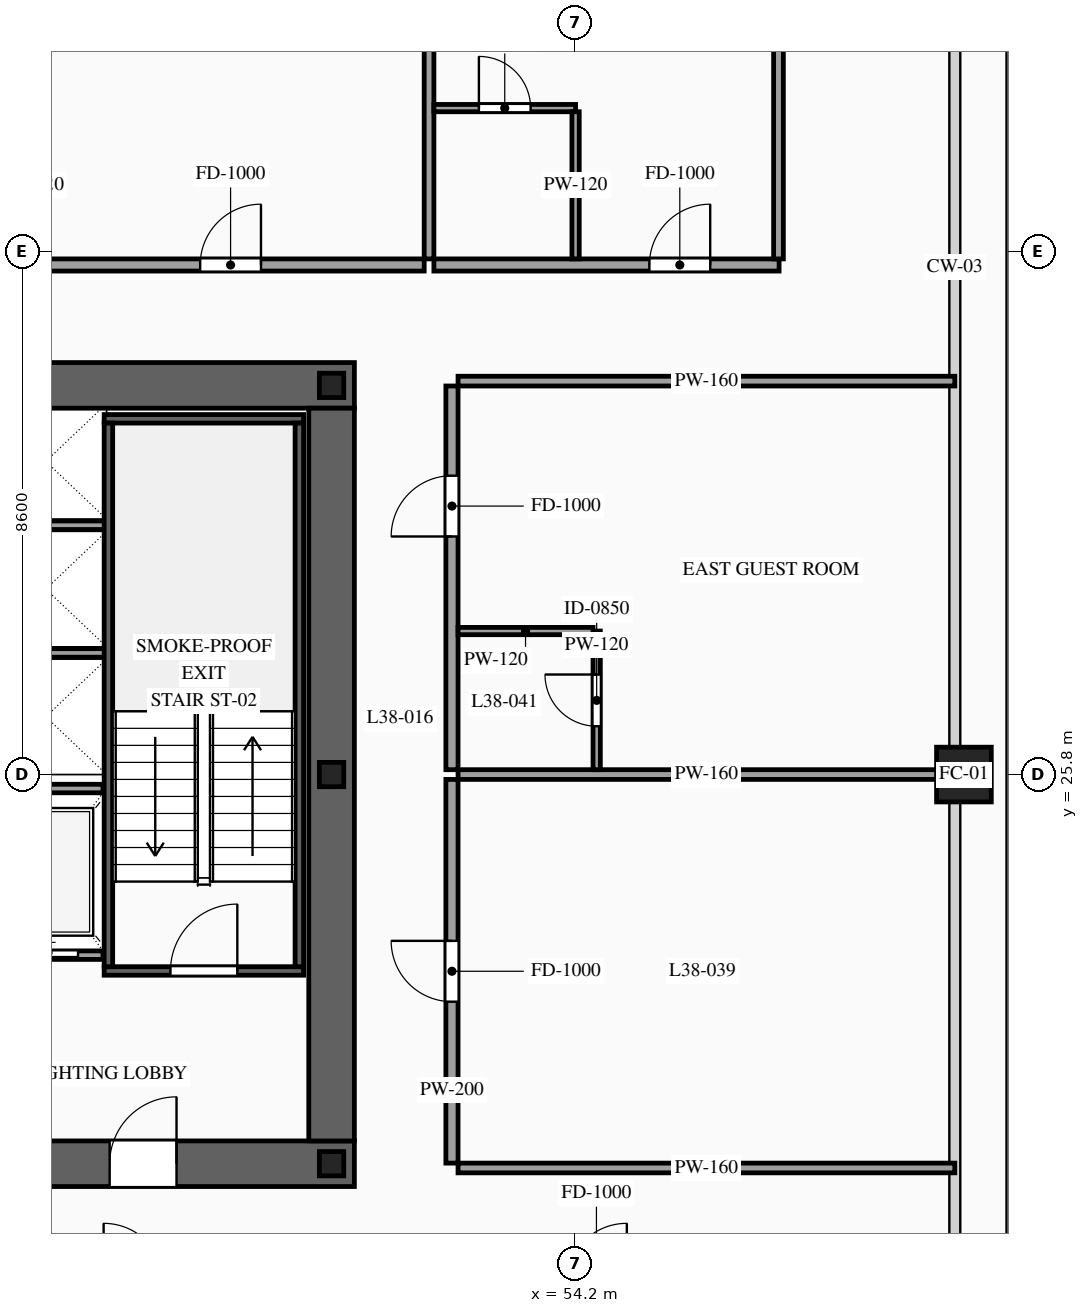
"""IFC4 building model, lengths in metres.
Left out: names, types, materials, properties, quantities, classifications, styles, units other than length and angle.
Written with IfcOpenShell. Run it as: python <this file> out.ifc"""

import sys

from ifc_helpers import new_model, si_unit, direction, frame, frame_2d, origin, origin_2d, place, context, subcontext, project, spatial, rectangle, hollow_rectangle, i_section, extrude, source, transform, mapped, element, fill, save


model = new_model("IFC4")
c1 = context("Model", 3, precision=1e-05, world=origin(), true_north=direction((0.0, 1.0)))
c2 = subcontext(c1, "Body", "Model", "MODEL_VIEW")
j1 = project(units=[si_unit("LENGTHUNIT", "METRE"), si_unit("PLANEANGLEUNIT", "RADIAN")], contexts=[c1])
p1 = place(None, origin())
s1 = spatial("IfcSite", under=j1, at=p1, CompositionType="ELEMENT")
p2 = place(p1, origin())
s2 = spatial("IfcBuilding", under=s1, at=p2, CompositionType="ELEMENT")
p3 = place(p2, frame((0.0, 0.0, 145.2)))
s3 = spatial("IfcBuildingStorey", under=s2, at=p3, CompositionType="ELEMENT", Elevation=145.2)
p4 = place(p3, frame((23.425, 19.4, 0.0), z_axis=(0.0, 0.0, 1.0), x_axis=(1.0, 0.0, 0.0)))
e1 = element("IfcWall", 1, at=p4, inside=s3, PredefinedType="SHEAR", context=c2, shape_type="SweptSolid", body=[
    extrude(rectangle(XDim=27.15, YDim=0.75, at=frame_2d((13.575, 0.0))), origin(), (0.0, 0.0, 1.0), 3.6),
])
p5 = place(p4, frame((2.025, 0.0, 0.0)))
e2 = element("IfcOpeningElement", 2, at=p5, cuts=e1, PredefinedType="OPENING", context=c2, shape_type="SweptSolid", body=[
    extrude(rectangle(XDim=1.1, YDim=2.2, at=frame_2d((0.55, 1.1))), frame((0.0, 0.39, 0.0), z_axis=(0.0, -1.0, 0.0), x_axis=(1.0, 0.0, 0.0)), (0.0, 0.0, 1.0), 0.78),
])
p6 = place(p4, frame((9.925, 0.0, 0.0)))
e3 = element("IfcOpeningElement", 3, at=p6, cuts=e1, PredefinedType="OPENING", context=c2, shape_type="SweptSolid", body=[
    extrude(rectangle(XDim=1.1, YDim=2.2, at=frame_2d((0.55, 1.1))), frame((0.0, 0.39, 0.0), z_axis=(0.0, -1.0, 0.0), x_axis=(1.0, 0.0, 0.0)), (0.0, 0.0, 1.0), 0.78),
])
p7 = place(p4, frame((23.125, 0.0, 0.0)))
e4 = element("IfcOpeningElement", 4, at=p7, cuts=e1, PredefinedType="OPENING", context=c2, shape_type="SweptSolid", body=[
    extrude(rectangle(XDim=1.1, YDim=2.2, at=frame_2d((0.55, 1.1))), frame((0.0, 0.39, 0.0), z_axis=(0.0, -1.0, 0.0), x_axis=(1.0, 0.0, 0.0)), (0.0, 0.0, 1.0), 0.78),
])
p8 = place(p4, frame((19.745, 0.0, 0.0)))
e5 = element("IfcOpeningElement", 5, at=p8, cuts=e1, PredefinedType="OPENING", context=c2, shape_type="SweptSolid", body=[
    extrude(rectangle(XDim=0.9, YDim=2.15, at=frame_2d((0.45, 1.075))), frame((0.0, 0.39, 0.0), z_axis=(0.0, -1.0, 0.0), x_axis=(1.0, 0.0, 0.0)), (0.0, 0.0, 1.0), 0.78),
])
p9 = place(p4, frame((18.305, 0.0, 0.0)))
e6 = element("IfcOpeningElement", 6, at=p9, cuts=e1, PredefinedType="OPENING", context=c2, shape_type="SweptSolid", body=[
    extrude(rectangle(XDim=0.9, YDim=2.15, at=frame_2d((0.45, 1.075))), frame((0.0, 0.39, 0.0), z_axis=(0.0, -1.0, 0.0), x_axis=(1.0, 0.0, 0.0)), (0.0, 0.0, 1.0), 0.78),
])
p10 = place(p3, frame((23.425, 32.2, 0.0), z_axis=(0.0, 0.0, 1.0), x_axis=(1.0, 0.0, 0.0)))
e7 = element("IfcWall", 7, at=p10, inside=s3, PredefinedType="SHEAR", context=c2, shape_type="SweptSolid", body=[
    extrude(rectangle(XDim=27.15, YDim=0.75, at=frame_2d((13.575, 0.0))), origin(), (0.0, 0.0, 1.0), 3.6),
])
p11 = place(p10, frame((4.645, 0.0, 0.0)))
e8 = element("IfcOpeningElement", 8, at=p11, cuts=e7, PredefinedType="OPENING", context=c2, shape_type="SweptSolid", body=[
    extrude(rectangle(XDim=0.9, YDim=2.15, at=frame_2d((0.45, 1.075))), frame((0.0, 0.39, 0.0), z_axis=(0.0, -1.0, 0.0), x_axis=(1.0, 0.0, 0.0)), (0.0, 0.0, 1.0), 0.78),
])
p12 = place(p10, frame((9.925, 0.0, 0.0)))
e9 = element("IfcOpeningElement", 9, at=p12, cuts=e7, PredefinedType="OPENING", context=c2, shape_type="SweptSolid", body=[
    extrude(rectangle(XDim=1.1, YDim=2.2, at=frame_2d((0.55, 1.1))), frame((0.0, 0.39, 0.0), z_axis=(0.0, -1.0, 0.0), x_axis=(1.0, 0.0, 0.0)), (0.0, 0.0, 1.0), 0.78),
])
p13 = place(p10, frame((15.775, 0.0, 0.0)))
e10 = element("IfcOpeningElement", 10, at=p13, cuts=e7, PredefinedType="OPENING", context=c2, shape_type="SweptSolid", body=[
    extrude(rectangle(XDim=1.1, YDim=2.2, at=frame_2d((0.55, 1.1))), frame((0.0, 0.39, 0.0), z_axis=(0.0, -1.0, 0.0), x_axis=(1.0, 0.0, 0.0)), (0.0, 0.0, 1.0), 0.78),
])
p14 = place(p10, frame((19.745, 0.0, 0.0)))
e11 = element("IfcOpeningElement", 11, at=p14, cuts=e7, PredefinedType="OPENING", context=c2, shape_type="SweptSolid", body=[
    extrude(rectangle(XDim=0.9, YDim=2.15, at=frame_2d((0.45, 1.075))), frame((0.0, 0.39, 0.0), z_axis=(0.0, -1.0, 0.0), x_axis=(1.0, 0.0, 0.0)), (0.0, 0.0, 1.0), 0.78),
])
m1 = source(origin(), c2, "Body", "SweptSolid", [
    extrude(rectangle(XDim=12.05, YDim=0.75, at=frame_2d((6.025, 0.0))), origin(), (0.0, 0.0, 1.0), 3.6),
])
p15 = place(p3, frame((50.2, 19.775, 0.0), z_axis=(0.0, 0.0, 1.0), x_axis=(0.0, 1.0, 0.0)))
e12 = element("IfcWall", 12, at=p15, inside=s3, PredefinedType="SHEAR", context=c2, shape_type="MappedRepresentation", body=[
    mapped(m1, transform((0.0, 0.0, 0.0), scale=1.0)),
])
m2 = source(origin(), c2, "Body", "SweptSolid", [
    extrude(i_section(OverallWidth=0.4, OverallDepth=0.4, WebThickness=0.013, FlangeThickness=0.021, at=origin_2d()), origin(), (0.0, 0.0, 1.0), 3.6),
])
for number, where, z_axis, x_axis in (
    (13, (50.2, 19.4, 0.0), (0.0, 0.0, 1.0), (1.0, 0.0, 0.0)),
    (14, (50.2, 25.8, 0.0), (0.0, 0.0, 1.0), (1.0, 0.0, 0.0)),
    (15, (50.2, 32.2, 0.0), (0.0, 0.0, 1.0), (1.0, 0.0, 0.0)),
):
    element("IfcColumn", number, at=place(p3, frame(where, z_axis=z_axis, x_axis=x_axis)), inside=s3, PredefinedType="COLUMN", context=c2, shape_type="MappedRepresentation", body=[
        mapped(m2, transform((0.0, 0.0, 0.0), scale=1.0)),
    ])
m3 = source(origin(), c2, "Body", "SweptSolid", [
    extrude(hollow_rectangle(XDim=0.9, YDim=0.9, WallThickness=0.042, at=origin_2d()), origin(), (0.0, 0.0, 1.0), 3.6),
])
p16 = place(p3, frame((60.6, 25.8, 0.0), z_axis=(0.0, 0.0, 1.0), x_axis=(1.0, 0.0, 0.0)))
e16 = element("IfcColumn", 16, at=p16, inside=s3, PredefinedType="COLUMN", context=c2, shape_type="MappedRepresentation", body=[
    mapped(m3, transform((0.0, 0.0, 0.0), scale=1.0)),
])
p17 = place(p3, frame((44.52, 22.83, 0.0), z_axis=(0.0, 0.0, 1.0), x_axis=(1.0, 0.0, 0.0)))
e17 = element("IfcWall", 17, at=p17, inside=s3, PredefinedType="SOLIDWALL", context=c2, shape_type="SweptSolid", body=[
    extrude(rectangle(XDim=1.92, YDim=0.14, at=frame_2d((0.96, 0.0))), origin(), (0.0, 0.0, 1.0), 3.38),
])
p18 = place(p17, frame((0.41, 0.0, 0.0)))
e18 = element("IfcOpeningElement", 18, at=p18, cuts=e17, PredefinedType="OPENING", context=c2, shape_type="SweptSolid", body=[
    extrude(rectangle(XDim=1.1, YDim=2.2, at=frame_2d((0.55, 1.1))), frame((0.0, 0.085, 0.0), z_axis=(0.0, -1.0, 0.0), x_axis=(1.0, 0.0, 0.0)), (0.0, 0.0, 1.0), 0.17),
])
m4 = source(origin(), c2, "Body", "SweptSolid", [
    extrude(rectangle(XDim=1.92, YDim=0.14, at=frame_2d((0.96, 0.0))), origin(), (0.0, 0.0, 1.0), 3.38),
])
p19 = place(p3, frame((44.52, 25.57, 0.0), z_axis=(0.0, 0.0, 1.0), x_axis=(1.0, 0.0, 0.0)))
e19 = element("IfcWall", 19, at=p19, inside=s3, PredefinedType="SOLIDWALL", context=c2, shape_type="MappedRepresentation", body=[
    mapped(m4, transform((0.0, 0.0, 0.0), scale=1.0)),
])
m5 = source(origin(), c2, "Body", "SweptSolid", [
    extrude(rectangle(XDim=2.0, YDim=0.14, at=frame_2d((1.0, 0.0))), origin(), (0.0, 0.0, 1.0), 3.38),
])
for number, where, z_axis, x_axis in (
    (20, (44.5, 27.8, 0.0), (0.0, 0.0, 1.0), (1.0, 0.0, 0.0)),
    (21, (44.5, 29.9, 0.0), (0.0, 0.0, 1.0), (1.0, 0.0, 0.0)),
):
    element("IfcWall", number, at=place(p3, frame(where, z_axis=z_axis, x_axis=x_axis)), inside=s3, PredefinedType="SOLIDWALL", context=c2, shape_type="MappedRepresentation", body=[
        mapped(m5, transform((0.0, 0.0, 0.0), scale=1.0)),
    ])
p20 = place(p3, frame((46.46, 22.57, 0.0), z_axis=(0.0, 0.0, 1.0), x_axis=(1.0, 0.0, 0.0)))
e22 = element("IfcWall", 22, at=p20, inside=s3, PredefinedType="SOLIDWALL", context=c2, shape_type="SweptSolid", body=[
    extrude(rectangle(XDim=3.28, YDim=0.14, at=frame_2d((1.64, 0.0))), origin(), (0.0, 0.0, 1.0), 3.38),
])
p21 = place(p20, frame((1.09, 0.0, 0.0)))
e23 = element("IfcOpeningElement", 23, at=p21, cuts=e22, PredefinedType="OPENING", context=c2, shape_type="SweptSolid", body=[
    extrude(rectangle(XDim=1.1, YDim=2.2, at=frame_2d((0.55, 1.1))), frame((0.0, 0.085, 0.0), z_axis=(0.0, -1.0, 0.0), x_axis=(1.0, 0.0, 0.0)), (0.0, 0.0, 1.0), 0.17),
])
m6 = source(origin(), c2, "Body", "SweptSolid", [
    extrude(rectangle(XDim=3.28, YDim=0.14, at=frame_2d((1.64, 0.0))), origin(), (0.0, 0.0, 1.0), 3.38),
])
p22 = place(p3, frame((46.46, 31.65, 0.0), z_axis=(0.0, 0.0, 1.0), x_axis=(1.0, 0.0, 0.0)))
e24 = element("IfcWall", 24, at=p22, inside=s3, PredefinedType="SOLIDWALL", context=c2, shape_type="MappedRepresentation", body=[
    mapped(m6, transform((0.0, 0.0, 0.0), scale=1.0)),
])
m7 = source(origin(), c2, "Body", "SweptSolid", [
    extrude(rectangle(XDim=8.94, YDim=0.14, at=frame_2d((4.47, 0.0))), origin(), (0.0, 0.0, 1.0), 3.38),
])
for number, where, z_axis, x_axis in (
    (25, (46.53, 22.64, 0.0), (0.0, 0.0, 1.0), (0.0, 1.0, 0.0)),
    (26, (49.67, 22.64, 0.0), (0.0, 0.0, 1.0), (0.0, 1.0, 0.0)),
):
    element("IfcWall", number, at=place(p3, frame(where, z_axis=z_axis, x_axis=x_axis)), inside=s3, PredefinedType="SOLIDWALL", context=c2, shape_type="MappedRepresentation", body=[
        mapped(m7, transform((0.0, 0.0, 0.0), scale=1.0)),
    ])
p23 = place(p3, frame((42.946, 34.18, 0.0), z_axis=(0.0, 0.0, 1.0), x_axis=(1.0, 0.0, 0.0)))
e27 = element("IfcWall", 27, at=p23, inside=s3, PredefinedType="PARTITIONING", context=c2, shape_type="SweptSolid", body=[
    extrude(rectangle(XDim=8.777, YDim=0.2, at=frame_2d((4.388, 0.0))), origin(), (0.0, 0.0, 1.0), 3.38),
])
p24 = place(p23, frame((5.093, 0.0, 0.0)))
e28 = element("IfcOpeningElement", 28, at=p24, cuts=e27, PredefinedType="OPENING", context=c2, shape_type="SweptSolid", body=[
    extrude(rectangle(XDim=1.0, YDim=2.2, at=frame_2d((0.5, 1.1))), frame((0.0, 0.115, 0.0), z_axis=(0.0, -1.0, 0.0), x_axis=(1.0, 0.0, 0.0)), (0.0, 0.0, 1.0), 0.23),
])
m8 = source(origin(), c2, "Body", "SweptSolid", [
    extrude(rectangle(XDim=14.97, YDim=0.16, at=frame_2d((7.485, 0.0))), origin(), (0.0, 0.0, 1.0), 3.38),
])
p25 = place(p3, frame((51.803, 34.28, 0.0), z_axis=(0.0, 0.0, 1.0), x_axis=(0.0, 1.0, 0.0)))
e29 = element("IfcWall", 29, at=p25, inside=s3, PredefinedType="PARTITIONING", context=c2, shape_type="MappedRepresentation", body=[
    mapped(m8, transform((0.0, 0.0, 0.0), scale=1.0)),
])
p26 = place(p3, frame((51.883, 34.18, 0.0), z_axis=(0.0, 0.0, 1.0), x_axis=(1.0, 0.0, 0.0)))
e30 = element("IfcWall", 30, at=p26, inside=s3, PredefinedType="PARTITIONING", context=c2, shape_type="SweptSolid", body=[
    extrude(rectangle(XDim=5.677, YDim=0.2, at=frame_2d((2.838, 0.0))), origin(), (0.0, 0.0, 1.0), 3.38),
])
p27 = place(p26, frame((3.544, 0.0, 0.0)))
e31 = element("IfcOpeningElement", 31, at=p27, cuts=e30, PredefinedType="OPENING", context=c2, shape_type="SweptSolid", body=[
    extrude(rectangle(XDim=1.0, YDim=2.2, at=frame_2d((0.5, 1.1))), frame((0.0, 0.115, 0.0), z_axis=(0.0, -1.0, 0.0), x_axis=(1.0, 0.0, 0.0)), (0.0, 0.0, 1.0), 0.23),
])
m9 = source(origin(), c2, "Body", "SweptSolid", [
    extrude(rectangle(XDim=14.82, YDim=0.16, at=frame_2d((7.41, 0.0))), origin(), (0.0, 0.0, 1.0), 3.38),
])
p28 = place(p3, frame((57.55, 34.28, 0.0), z_axis=(0.0, 0.0, 1.0), x_axis=(0.0, 1.0, 0.0)))
e32 = element("IfcWall", 32, at=p28, inside=s3, PredefinedType="PARTITIONING", context=c2, shape_type="MappedRepresentation", body=[
    mapped(m9, transform((0.0, 0.0, 0.0), scale=1.0)),
])
p29 = place(p3, frame((51.883, 36.76, 0.0), z_axis=(0.0, 0.0, 1.0), x_axis=(1.0, 0.0, 0.0)))
e33 = element("IfcWall", 33, at=p29, inside=s3, PredefinedType="PARTITIONING", context=c2, shape_type="SweptSolid", body=[
    extrude(rectangle(XDim=2.33, YDim=0.12, at=frame_2d((1.165, 0.0))), origin(), (0.0, 0.0, 1.0), 3.38),
])
p30 = place(p29, frame((0.74, 0.0, 0.0)))
e34 = element("IfcOpeningElement", 34, at=p30, cuts=e33, PredefinedType="OPENING", context=c2, shape_type="SweptSolid", body=[
    extrude(rectangle(XDim=0.85, YDim=2.1, at=frame_2d((0.425, 1.05))), frame((0.0, 0.075, 0.0), z_axis=(0.0, -1.0, 0.0), x_axis=(1.0, 0.0, 0.0)), (0.0, 0.0, 1.0), 0.15),
])
m10 = source(origin(), c2, "Body", "SweptSolid", [
    extrude(rectangle(XDim=2.42, YDim=0.12, at=frame_2d((1.21, 0.0))), origin(), (0.0, 0.0, 1.0), 3.38),
])
p31 = place(p3, frame((54.213, 34.28, 0.0), z_axis=(0.0, 0.0, 1.0), x_axis=(0.0, 1.0, 0.0)))
e35 = element("IfcWall", 35, at=p31, inside=s3, PredefinedType="PARTITIONING", context=c2, shape_type="MappedRepresentation", body=[
    mapped(m10, transform((0.0, 0.0, 0.0), scale=1.0)),
])
p32 = place(p3, frame((52.18, 19.41, 0.0), z_axis=(0.0, 0.0, 1.0), x_axis=(0.0, 1.0, 0.0)))
e36 = element("IfcWall", 36, at=p32, inside=s3, PredefinedType="PARTITIONING", context=c2, shape_type="SweptSolid", body=[
    extrude(rectangle(XDim=6.31, YDim=0.2, at=frame_2d((3.155, 0.0))), origin(), (0.0, 0.0, 1.0), 3.38),
])
p33 = place(p32, frame((2.655, 0.0, 0.0)))
e37 = element("IfcOpeningElement", 37, at=p33, cuts=e36, PredefinedType="OPENING", context=c2, shape_type="SweptSolid", body=[
    extrude(rectangle(XDim=1.0, YDim=2.2, at=frame_2d((0.5, 1.1))), frame((0.0, 0.115, 0.0), z_axis=(0.0, -1.0, 0.0), x_axis=(1.0, 0.0, 0.0)), (0.0, 0.0, 1.0), 0.23),
])
m11 = source(origin(), c2, "Body", "SweptSolid", [
    extrude(rectangle(XDim=8.17, YDim=0.16, at=frame_2d((4.085, 0.0))), origin(), (0.0, 0.0, 1.0), 2.675),
])
p34 = place(p3, frame((52.28, 25.8, 0.0), z_axis=(0.0, 0.0, 1.0), x_axis=(1.0, 0.0, 0.0)))
e38 = element("IfcWall", 38, at=p34, inside=s3, PredefinedType="PARTITIONING", context=c2, shape_type="MappedRepresentation", body=[
    mapped(m11, transform((0.0, 0.0, 0.0), scale=1.0)),
])
m12 = source(origin(), c2, "Body", "SweptSolid", [
    extrude(rectangle(XDim=8.17, YDim=0.16, at=frame_2d((4.085, 0.0))), origin(), (0.0, 0.0, 1.0), 2.875),
])
p35 = place(p3, frame((52.28, 19.33, 0.0), z_axis=(0.0, 0.0, 1.0), x_axis=(1.0, 0.0, 0.0)))
e39 = element("IfcWall", 39, at=p35, inside=s3, PredefinedType="PARTITIONING", context=c2, shape_type="MappedRepresentation", body=[
    mapped(m12, transform((0.0, 0.0, 0.0), scale=1.0)),
])
p36 = place(p3, frame((52.18, 25.88, 0.0), z_axis=(0.0, 0.0, 1.0), x_axis=(0.0, 1.0, 0.0)))
e40 = element("IfcWall", 40, at=p36, inside=s3, PredefinedType="PARTITIONING", context=c2, shape_type="SweptSolid", body=[
    extrude(rectangle(XDim=6.31, YDim=0.2, at=frame_2d((3.155, 0.0))), origin(), (0.0, 0.0, 1.0), 3.38),
])
p37 = place(p36, frame((3.835, 0.0, 0.0)))
e41 = element("IfcOpeningElement", 41, at=p37, cuts=e40, PredefinedType="OPENING", context=c2, shape_type="SweptSolid", body=[
    extrude(rectangle(XDim=1.0, YDim=2.2, at=frame_2d((0.5, 1.1))), frame((0.0, 0.115, 0.0), z_axis=(0.0, -1.0, 0.0), x_axis=(1.0, 0.0, 0.0)), (0.0, 0.0, 1.0), 0.23),
])
p38 = place(p3, frame((52.28, 32.27, 0.0), z_axis=(0.0, 0.0, 1.0), x_axis=(1.0, 0.0, 0.0)))
e42 = element("IfcWall", 42, at=p38, inside=s3, PredefinedType="PARTITIONING", context=c2, shape_type="MappedRepresentation", body=[
    mapped(m12, transform((0.0, 0.0, 0.0), scale=1.0)),
])
p39 = place(p3, frame((54.56, 25.88, 0.0), z_axis=(0.0, 0.0, 1.0), x_axis=(0.0, 1.0, 0.0)))
e43 = element("IfcWall", 43, at=p39, inside=s3, PredefinedType="PARTITIONING", context=c2, shape_type="SweptSolid", body=[
    extrude(rectangle(XDim=2.28, YDim=0.12, at=frame_2d((1.14, 0.0))), origin(), (0.0, 0.0, 1.0), 3.38),
])
p40 = place(p39, frame((0.715, 0.0, 0.0)))
e44 = element("IfcOpeningElement", 44, at=p40, cuts=e43, PredefinedType="OPENING", context=c2, shape_type="SweptSolid", body=[
    extrude(rectangle(XDim=0.85, YDim=2.1, at=frame_2d((0.425, 1.05))), frame((0.0, 0.075, 0.0), z_axis=(0.0, -1.0, 0.0), x_axis=(1.0, 0.0, 0.0)), (0.0, 0.0, 1.0), 0.15),
])
m13 = source(origin(), c2, "Body", "SweptSolid", [
    extrude(rectangle(XDim=2.22, YDim=0.12, at=frame_2d((1.11, 0.0))), origin(), (0.0, 0.0, 1.0), 3.38),
])
p41 = place(p3, frame((52.28, 28.16, 0.0), z_axis=(0.0, 0.0, 1.0), x_axis=(1.0, 0.0, 0.0)))
e45 = element("IfcWall", 45, at=p41, inside=s3, PredefinedType="PARTITIONING", context=c2, shape_type="MappedRepresentation", body=[
    mapped(m13, transform((0.0, 0.0, 0.0), scale=1.0)),
])
m14 = source(origin(), c2, "Body", "SweptSolid", [
    extrude(rectangle(XDim=1.1, YDim=2.2, at=frame_2d((0.55, 1.1))), frame((0.0, 0.025, 0.0), z_axis=(0.0, -1.0, 0.0), x_axis=(1.0, 0.0, 0.0)), (0.0, 0.0, 1.0), 0.05),
])
p42 = place(p18, origin())
e46 = element("IfcDoor", 46, at=p42, inside=s3, OperationType="SLIDING_TO_RIGHT", PredefinedType="DOOR", context=c2, shape_type="MappedRepresentation", body=[
    mapped(m14, transform((0.0, 0.0, 0.0), scale=1.0)),
])
fill(e18, e46)
m15 = source(origin(), c2, "Body", "SweptSolid", [
    extrude(rectangle(XDim=1.1, YDim=2.2, at=frame_2d((0.55, 1.1))), frame((0.0, 0.025, 0.0), z_axis=(0.0, -1.0, 0.0), x_axis=(1.0, 0.0, 0.0)), (0.0, 0.0, 1.0), 0.05),
])
p43 = place(p21, origin())
e47 = element("IfcDoor", 47, at=p43, inside=s3, OperationType="SINGLE_SWING_RIGHT", PredefinedType="DOOR", context=c2, shape_type="MappedRepresentation", body=[
    mapped(m15, transform((0.0, 0.0, 0.0), scale=1.0)),
])
fill(e23, e47)
p44 = place(p7, origin())
e48 = element("IfcDoor", 48, at=p44, inside=s3, OperationType="SINGLE_SWING_RIGHT", PredefinedType="DOOR", context=c2, shape_type="MappedRepresentation", body=[
    mapped(m15, transform((0.0, 0.0, 0.0), scale=1.0)),
])
fill(e4, e48)
m16 = source(origin(), c2, "Body", "SweptSolid", [
    extrude(rectangle(XDim=1.0, YDim=2.2, at=frame_2d((0.5, 1.1))), frame((0.0, 0.025, 0.0), z_axis=(0.0, -1.0, 0.0), x_axis=(1.0, 0.0, 0.0)), (0.0, 0.0, 1.0), 0.05),
])
p45 = place(p24, origin())
e49 = element("IfcDoor", 49, at=p45, inside=s3, OperationType="SINGLE_SWING_RIGHT", PredefinedType="DOOR", context=c2, shape_type="MappedRepresentation", body=[
    mapped(m16, transform((0.0, 0.0, 0.0), scale=1.0)),
])
fill(e28, e49)
p46 = place(p27, origin())
e50 = element("IfcDoor", 50, at=p46, inside=s3, OperationType="SINGLE_SWING_RIGHT", PredefinedType="DOOR", context=c2, shape_type="MappedRepresentation", body=[
    mapped(m16, transform((0.0, 0.0, 0.0), scale=1.0)),
])
fill(e31, e50)
m17 = source(origin(), c2, "Body", "SweptSolid", [
    extrude(rectangle(XDim=0.85, YDim=2.1, at=frame_2d((0.425, 1.05))), frame((0.0, 0.025, 0.0), z_axis=(0.0, -1.0, 0.0), x_axis=(1.0, 0.0, 0.0)), (0.0, 0.0, 1.0), 0.05),
])
p47 = place(p30, origin())
e51 = element("IfcDoor", 51, at=p47, inside=s3, OperationType="SINGLE_SWING_LEFT", PredefinedType="DOOR", context=c2, shape_type="MappedRepresentation", body=[
    mapped(m17, transform((0.0, 0.0, 0.0), scale=1.0)),
])
fill(e34, e51)
p48 = place(p33, origin())
e52 = element("IfcDoor", 52, at=p48, inside=s3, OperationType="SINGLE_SWING_RIGHT", PredefinedType="DOOR", context=c2, shape_type="MappedRepresentation", body=[
    mapped(m16, transform((0.0, 0.0, 0.0), scale=1.0)),
])
fill(e37, e52)
p49 = place(p37, origin())
e53 = element("IfcDoor", 53, at=p49, inside=s3, OperationType="SINGLE_SWING_LEFT", PredefinedType="DOOR", context=c2, shape_type="MappedRepresentation", body=[
    mapped(m16, transform((0.0, 0.0, 0.0), scale=1.0)),
])
fill(e41, e53)
p50 = place(p40, origin())
e54 = element("IfcDoor", 54, at=p50, inside=s3, OperationType="SINGLE_SWING_RIGHT", PredefinedType="DOOR", context=c2, shape_type="MappedRepresentation", body=[
    mapped(m17, transform((0.0, 0.0, 0.0), scale=1.0)),
])
fill(e44, e54)
save(model, sys.argv[1])
